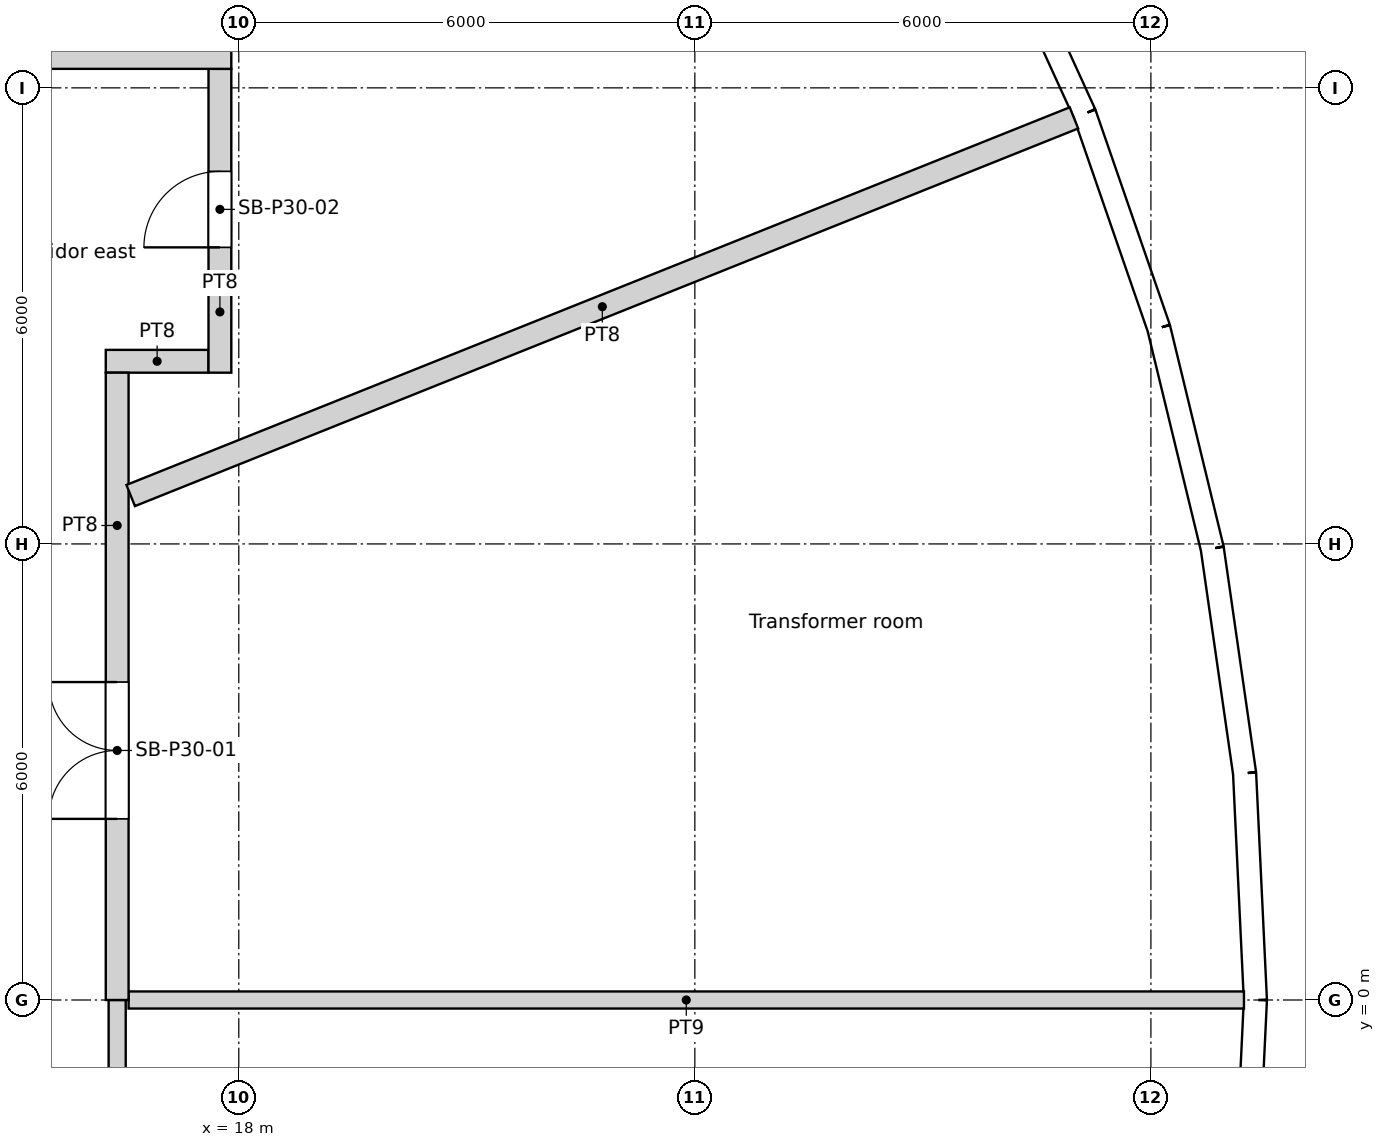
"""IFC4 building model, lengths in metres.
Left out: names, types, materials, properties, quantities, classifications, styles, units other than length and angle.
Written with IfcOpenShell. Run it as: python <this file> out.ifc"""

import sys

from ifc_helpers import new_model, si_unit, direction, frame, frame_2d, origin, origin_2d, place, context, subcontext, project, spatial, rectangle, circle, extrude, element, fill, save


model = new_model("IFC4")
c1 = context("Model", 3, precision=1e-05, world=origin(), true_north=direction((0.0, 1.0)))
c2 = subcontext(c1, "Body", "Model", "MODEL_VIEW")
j1 = project(units=[si_unit("LENGTHUNIT", "METRE"), si_unit("PLANEANGLEUNIT", "RADIAN")], contexts=[c1])
p1 = place(None, origin())
s1 = spatial("IfcSite", under=j1, at=p1, CompositionType="ELEMENT")
p2 = place(p1, origin())
s2 = spatial("IfcBuilding", under=s1, at=p2, CompositionType="ELEMENT")
p3 = place(p2, frame((0.0, 0.0, 120.0)))
s3 = spatial("IfcBuildingStorey", under=s2, at=p3, CompositionType="ELEMENT", Elevation=120.0)
for number, where, z_axis, x_axis in (
    (1, (30.275, 0.0, 0.0), (0.0, 0.0, 1.0), (1.0, 0.0, 0.0)),
    (2, (29.728, 5.729, 0.0), (0.0, 0.0, 1.0), (1.0, 0.0, 0.0)),
    (3, (28.106, 11.252, 0.0), (0.0, 0.0, 1.0), (1.0, 0.0, 0.0)),
):
    element("IfcColumn", number, at=place(p3, frame(where, z_axis=z_axis, x_axis=x_axis)), inside=s3, PredefinedType="COLUMN", context=c2, shape_type="SweptSolid", body=[
        extrude(circle(Radius=0.6, at=origin_2d()), origin(), (0.0, 0.0, 1.0), 6.0),
    ])
for number, where, z_axis, x_axis in (
    (4, (24.548, 0.0, 0.0), (0.0, 0.0, 1.0), (1.0, 0.0, 0.0)),
    (5, (23.886, 5.661, 0.0), (0.0, 0.0, 1.0), (1.0, 0.0, 0.0)),
    (6, (21.937, 11.017, 0.0), (0.0, 0.0, 1.0), (1.0, 0.0, 0.0)),
):
    element("IfcColumn", number, at=place(p3, frame(where, z_axis=z_axis, x_axis=x_axis)), inside=s3, PredefinedType="COLUMN", context=c2, shape_type="SweptSolid", body=[
        extrude(circle(Radius=0.65, at=origin_2d()), origin(), (0.0, 0.0, 1.0), 6.0),
    ])
for number, where, z_axis, x_axis in (
    (7, (18.822, 0.0, 0.0), (0.0, 0.0, 1.0), (1.0, 0.0, 0.0)),
    (8, (17.986, 5.548, 0.0), (0.0, 0.0, 1.0), (1.0, 0.0, 0.0)),
    (9, (15.552, 10.603, 0.0), (0.0, 0.0, 1.0), (1.0, 0.0, 0.0)),
):
    element("IfcColumn", number, at=place(p3, frame(where, z_axis=z_axis, x_axis=x_axis)), inside=s3, PredefinedType="COLUMN", context=c2, shape_type="SweptSolid", body=[
        extrude(circle(Radius=0.7, at=origin_2d()), origin(), (0.0, 0.0, 1.0), 6.0),
    ])
p4 = place(p3, frame((31.375, 0.0, 0.0), z_axis=(0.0, 0.0, 1.0), x_axis=(-0.047588458579, 0.998867027492, 0.0)))
e10 = element("IfcWall", 10, at=p4, inside=s3, PredefinedType="SOLIDWALL", context=c2, shape_type="SweptSolid", body=[
    extrude(rectangle(XDim=2.986, YDim=0.3, at=frame_2d((1.493, 0.0))), origin(), (0.0, 0.0, 1.0), 5.7),
])
p5 = place(p4, frame((1.493, 0.0, 1.8)))
e11 = element("IfcOpeningElement", 11, at=p5, cuts=e10, PredefinedType="OPENING", context=c2, shape_type="SweptSolid", body=[
    extrude(circle(Radius=1.2, at=origin_2d()), frame((0.0, 0.16, 0.0), z_axis=(0.0, -1.0, 0.0), x_axis=(1.0, 0.0, 0.0)), (0.0, 0.0, 1.0), 0.32),
])
p6 = place(p3, frame((31.232, 2.982, 0.0), z_axis=(0.0, 0.0, 1.0), x_axis=(-0.142360001917, 0.989814947278, 0.0)))
e12 = element("IfcWall", 12, at=p6, inside=s3, PredefinedType="SOLIDWALL", context=c2, shape_type="SweptSolid", body=[
    extrude(rectangle(XDim=2.986, YDim=0.3, at=frame_2d((1.493, 0.0))), origin(), (0.0, 0.0, 1.0), 5.7),
])
p7 = place(p6, frame((1.493, 0.0, 1.8)))
e13 = element("IfcOpeningElement", 13, at=p7, cuts=e12, PredefinedType="OPENING", context=c2, shape_type="SweptSolid", body=[
    extrude(circle(Radius=1.2, at=origin_2d()), frame((0.0, 0.16, 0.0), z_axis=(0.0, -1.0, 0.0), x_axis=(1.0, 0.0, 0.0)), (0.0, 0.0, 1.0), 0.32),
])
p8 = place(p3, frame((30.807, 5.938, 0.0), z_axis=(0.0, 0.0, 1.0), x_axis=(-0.235756834479, 0.971812078026, 0.0)))
e14 = element("IfcWall", 14, at=p8, inside=s3, PredefinedType="SOLIDWALL", context=c2, shape_type="SweptSolid", body=[
    extrude(rectangle(XDim=2.986, YDim=0.3, at=frame_2d((1.493, 0.0))), origin(), (0.0, 0.0, 1.0), 5.7),
])
p9 = place(p8, frame((1.493, 0.0, 1.8)))
e15 = element("IfcOpeningElement", 15, at=p9, cuts=e14, PredefinedType="OPENING", context=c2, shape_type="SweptSolid", body=[
    extrude(circle(Radius=1.2, at=origin_2d()), frame((0.0, 0.16, 0.0), z_axis=(0.0, -1.0, 0.0), x_axis=(1.0, 0.0, 0.0)), (0.0, 0.0, 1.0), 0.32),
])
p10 = place(p3, frame((30.104, 8.839, 0.0), z_axis=(0.0, 0.0, 1.0), x_axis=(-0.327074054052, 0.944998710669, 0.0)))
e16 = element("IfcWall", 16, at=p10, inside=s3, PredefinedType="SOLIDWALL", context=c2, shape_type="SweptSolid", body=[
    extrude(rectangle(XDim=2.986, YDim=0.3, at=frame_2d((1.493, 0.0))), origin(), (0.0, 0.0, 1.0), 5.7),
])
p11 = place(p10, frame((1.493, 0.0, 1.8)))
e17 = element("IfcOpeningElement", 17, at=p11, cuts=e16, PredefinedType="OPENING", context=c2, shape_type="SweptSolid", body=[
    extrude(circle(Radius=1.2, at=origin_2d()), frame((0.0, 0.16, 0.0), z_axis=(0.0, -1.0, 0.0), x_axis=(1.0, 0.0, 0.0)), (0.0, 0.0, 1.0), 0.32),
])
p12 = place(p3, frame((29.127, 11.661, 0.0), z_axis=(0.0, 0.0, 1.0), x_axis=(-0.415373250944, 0.909651066289, 0.0)))
e18 = element("IfcWall", 18, at=p12, inside=s3, PredefinedType="SOLIDWALL", context=c2, shape_type="SweptSolid", body=[
    extrude(rectangle(XDim=2.986, YDim=0.3, at=frame_2d((1.493, 0.0))), origin(), (0.0, 0.0, 1.0), 5.7),
])
p13 = place(p12, frame((1.493, 0.0, 1.8)))
e19 = element("IfcOpeningElement", 19, at=p13, cuts=e18, PredefinedType="OPENING", context=c2, shape_type="SweptSolid", body=[
    extrude(circle(Radius=1.2, at=origin_2d()), frame((0.0, 0.16, 0.0), z_axis=(0.0, -1.0, 0.0), x_axis=(1.0, 0.0, 0.0)), (0.0, 0.0, 1.0), 0.32),
])
p14 = place(p3, frame((31.232, -2.982, 0.0), z_axis=(0.0, 0.0, 1.0), x_axis=(0.047588458579, 0.998867027492, 0.0)))
e20 = element("IfcWall", 20, at=p14, inside=s3, PredefinedType="SOLIDWALL", context=c2, shape_type="SweptSolid", body=[
    extrude(rectangle(XDim=2.986, YDim=0.3, at=frame_2d((1.493, 0.0))), origin(), (0.0, 0.0, 1.0), 5.7),
])
p15 = place(p14, frame((1.493, 0.0, 1.8)))
e21 = element("IfcOpeningElement", 21, at=p15, cuts=e20, PredefinedType="OPENING", context=c2, shape_type="SweptSolid", body=[
    extrude(circle(Radius=1.2, at=origin_2d()), frame((0.0, 0.16, 0.0), z_axis=(0.0, -1.0, 0.0), x_axis=(1.0, 0.0, 0.0)), (0.0, 0.0, 1.0), 0.32),
])
p16 = place(p3, frame((16.4, -8.29, 0.0), z_axis=(0.0, 0.0, 1.0), x_axis=(0.0, 1.0, 0.0)))
e22 = element("IfcWall", 22, at=p16, inside=s3, PredefinedType="PARTITIONING", context=c2, shape_type="SweptSolid", body=[
    extrude(rectangle(XDim=8.29, YDim=0.225, at=frame_2d((4.145, 0.0))), origin(), (0.0, 0.0, 1.0), 5.2),
])
p17 = place(p16, frame((4.108, 0.0, 0.0)))
e23 = element("IfcOpeningElement", 23, at=p17, cuts=e22, PredefinedType="OPENING", context=c2, shape_type="SweptSolid", body=[
    extrude(rectangle(XDim=1.8, YDim=2.4, at=frame_2d((0.9, 1.2))), frame((0.0, 0.113, 0.0), z_axis=(0.0, -1.0, 0.0), x_axis=(1.0, 0.0, 0.0)), (0.0, 0.0, 1.0), 0.225),
])
p18 = place(p3, frame((16.4, 0.0, 0.0), z_axis=(0.0, 0.0, 1.0), x_axis=(0.0, 1.0, 0.0)))
e24 = element("IfcWall", 24, at=p18, inside=s3, PredefinedType="PARTITIONING", context=c2, shape_type="SweptSolid", body=[
    extrude(rectangle(XDim=8.253, YDim=0.3, at=frame_2d((4.126, 0.0))), origin(), (0.0, 0.0, 1.0), 5.2),
])
p19 = place(p18, frame((2.383, 0.0, 0.0)))
e25 = element("IfcOpeningElement", 25, at=p19, cuts=e24, PredefinedType="OPENING", context=c2, shape_type="SweptSolid", body=[
    extrude(rectangle(XDim=1.8, YDim=2.4, at=frame_2d((0.9, 1.2))), frame((0.0, 0.15, 0.0), z_axis=(0.0, -1.0, 0.0), x_axis=(1.0, 0.0, 0.0)), (0.0, 0.0, 1.0), 0.3),
])
p20 = place(p3, frame((16.25, 8.403, 0.0), z_axis=(0.0, 0.0, 1.0), x_axis=(1.0, 0.0, 0.0)))
e26 = element("IfcWall", 26, at=p20, inside=s3, PredefinedType="PARTITIONING", context=c2, shape_type="SweptSolid", body=[
    extrude(rectangle(XDim=1.352, YDim=0.3, at=frame_2d((0.676, 0.0))), origin(), (0.0, 0.0, 1.0), 5.2),
])
p21 = place(p3, frame((17.752, 8.253, 0.0), z_axis=(0.0, 0.0, 1.0), x_axis=(0.0, 1.0, 0.0)))
e27 = element("IfcWall", 27, at=p21, inside=s3, PredefinedType="PARTITIONING", context=c2, shape_type="SweptSolid", body=[
    extrude(rectangle(XDim=3.997, YDim=0.3, at=frame_2d((1.999, 0.0))), origin(), (0.0, 0.0, 1.0), 5.2),
])
p22 = place(p21, frame((1.649, 0.0, 0.0)))
e28 = element("IfcOpeningElement", 28, at=p22, cuts=e27, PredefinedType="OPENING", context=c2, shape_type="SweptSolid", body=[
    extrude(rectangle(XDim=1.0, YDim=2.1, at=frame_2d((0.5, 1.05))), frame((0.0, 0.15, 0.0), z_axis=(0.0, -1.0, 0.0), x_axis=(1.0, 0.0, 0.0)), (0.0, 0.0, 1.0), 0.3),
])
p23 = place(p3, frame((17.902, 12.4, 0.0), z_axis=(0.0, 0.0, 1.0), x_axis=(-1.0, 0.0, 0.0)))
e29 = element("IfcWall", 29, at=p23, inside=s3, PredefinedType="PARTITIONING", context=c2, shape_type="SweptSolid", body=[
    extrude(rectangle(XDim=17.311, YDim=0.3, at=frame_2d((8.655, 0.0))), origin(), (0.0, 0.0, 1.0), 5.2),
])
p24 = place(p23, frame((7.668, 0.0, 0.0)))
e30 = element("IfcOpeningElement", 30, at=p24, cuts=e29, PredefinedType="OPENING", context=c2, shape_type="SweptSolid", body=[
    extrude(rectangle(XDim=1.8, YDim=2.4, at=frame_2d((0.9, 1.2))), frame((0.0, 0.15, 0.0), z_axis=(0.0, -1.0, 0.0), x_axis=(1.0, 0.0, 0.0)), (0.0, 0.0, 1.0), 0.3),
])
p25 = place(p23, frame((13.875, 0.0, 0.0)))
e31 = element("IfcOpeningElement", 31, at=p25, cuts=e29, PredefinedType="OPENING", context=c2, shape_type="SweptSolid", body=[
    extrude(rectangle(XDim=1.8, YDim=2.4, at=frame_2d((0.9, 1.2))), frame((0.0, 0.15, 0.0), z_axis=(0.0, -1.0, 0.0), x_axis=(1.0, 0.0, 0.0)), (0.0, 0.0, 1.0), 0.3),
])
p26 = place(p3, frame((28.988, 11.605, 0.0), z_axis=(0.0, 0.0, 1.0), x_axis=(-0.928363284364, -0.37167406722, 0.0)))
e32 = element("IfcWall", 32, at=p26, inside=s3, PredefinedType="PARTITIONING", context=c2, shape_type="SweptSolid", body=[
    extrude(rectangle(XDim=13.367, YDim=0.3, at=frame_2d((6.684, 0.0))), origin(), (0.0, 0.0, 1.0), 5.2),
])
p27 = place(p3, frame((31.224, 0.0, 0.0), z_axis=(0.0, 0.0, 1.0), x_axis=(-1.0, 0.0, 0.0)))
e33 = element("IfcWall", 33, at=p27, inside=s3, PredefinedType="PARTITIONING", context=c2, shape_type="SweptSolid", body=[
    extrude(rectangle(XDim=14.674, YDim=0.225, at=frame_2d((7.337, 0.0))), origin(), (0.0, 0.0, 1.0), 2.7),
])
p28 = place(p5, origin())
e34 = element("IfcWindow", 34, at=p28, inside=s3, PartitioningType="SINGLE_PANEL", PredefinedType="WINDOW", context=c2, shape_type="SweptSolid", body=[
    extrude(circle(Radius=1.2, at=origin_2d()), frame((0.0, 0.12, 0.0), z_axis=(0.0, -1.0, 0.0), x_axis=(1.0, 0.0, 0.0)), (0.0, 0.0, 1.0), 0.1),
])
fill(e11, e34)
p29 = place(p7, origin())
e35 = element("IfcWindow", 35, at=p29, inside=s3, PartitioningType="SINGLE_PANEL", PredefinedType="WINDOW", context=c2, shape_type="SweptSolid", body=[
    extrude(circle(Radius=1.2, at=origin_2d()), frame((0.0, 0.12, 0.0), z_axis=(0.0, -1.0, 0.0), x_axis=(1.0, 0.0, 0.0)), (0.0, 0.0, 1.0), 0.1),
])
fill(e13, e35)
p30 = place(p9, origin())
e36 = element("IfcWindow", 36, at=p30, inside=s3, PartitioningType="SINGLE_PANEL", PredefinedType="WINDOW", context=c2, shape_type="SweptSolid", body=[
    extrude(circle(Radius=1.2, at=origin_2d()), frame((0.0, 0.12, 0.0), z_axis=(0.0, -1.0, 0.0), x_axis=(1.0, 0.0, 0.0)), (0.0, 0.0, 1.0), 0.1),
])
fill(e15, e36)
p31 = place(p11, origin())
e37 = element("IfcWindow", 37, at=p31, inside=s3, PartitioningType="SINGLE_PANEL", PredefinedType="WINDOW", context=c2, shape_type="SweptSolid", body=[
    extrude(circle(Radius=1.2, at=origin_2d()), frame((0.0, 0.12, 0.0), z_axis=(0.0, -1.0, 0.0), x_axis=(1.0, 0.0, 0.0)), (0.0, 0.0, 1.0), 0.1),
])
fill(e17, e37)
p32 = place(p13, origin())
e38 = element("IfcWindow", 38, at=p32, inside=s3, PartitioningType="SINGLE_PANEL", PredefinedType="WINDOW", context=c2, shape_type="SweptSolid", body=[
    extrude(circle(Radius=1.2, at=origin_2d()), frame((0.0, 0.12, 0.0), z_axis=(0.0, -1.0, 0.0), x_axis=(1.0, 0.0, 0.0)), (0.0, 0.0, 1.0), 0.1),
])
fill(e19, e38)
p33 = place(p15, origin())
e39 = element("IfcWindow", 39, at=p33, inside=s3, PartitioningType="SINGLE_PANEL", PredefinedType="WINDOW", context=c2, shape_type="SweptSolid", body=[
    extrude(circle(Radius=1.2, at=origin_2d()), frame((0.0, 0.12, 0.0), z_axis=(0.0, -1.0, 0.0), x_axis=(1.0, 0.0, 0.0)), (0.0, 0.0, 1.0), 0.1),
])
fill(e21, e39)
p34 = place(p19, origin())
e40 = element("IfcDoor", 40, at=p34, inside=s3, OperationType="DOUBLE_DOOR_SINGLE_SWING", PredefinedType="DOOR", context=c2, shape_type="SweptSolid", body=[
    extrude(rectangle(XDim=1.8, YDim=2.4, at=frame_2d((0.9, 1.2))), frame((0.0, 0.025, 0.0), z_axis=(0.0, -1.0, 0.0), x_axis=(1.0, 0.0, 0.0)), (0.0, 0.0, 1.0), 0.05),
])
fill(e25, e40)
p35 = place(p22, origin())
e41 = element("IfcDoor", 41, at=p35, inside=s3, OperationType="SINGLE_SWING_LEFT", PredefinedType="DOOR", context=c2, shape_type="SweptSolid", body=[
    extrude(rectangle(XDim=1.0, YDim=2.1, at=frame_2d((0.5, 1.05))), frame((0.0, 0.025, 0.0), z_axis=(0.0, -1.0, 0.0), x_axis=(1.0, 0.0, 0.0)), (0.0, 0.0, 1.0), 0.05),
])
fill(e28, e41)
save(model, sys.argv[1])
